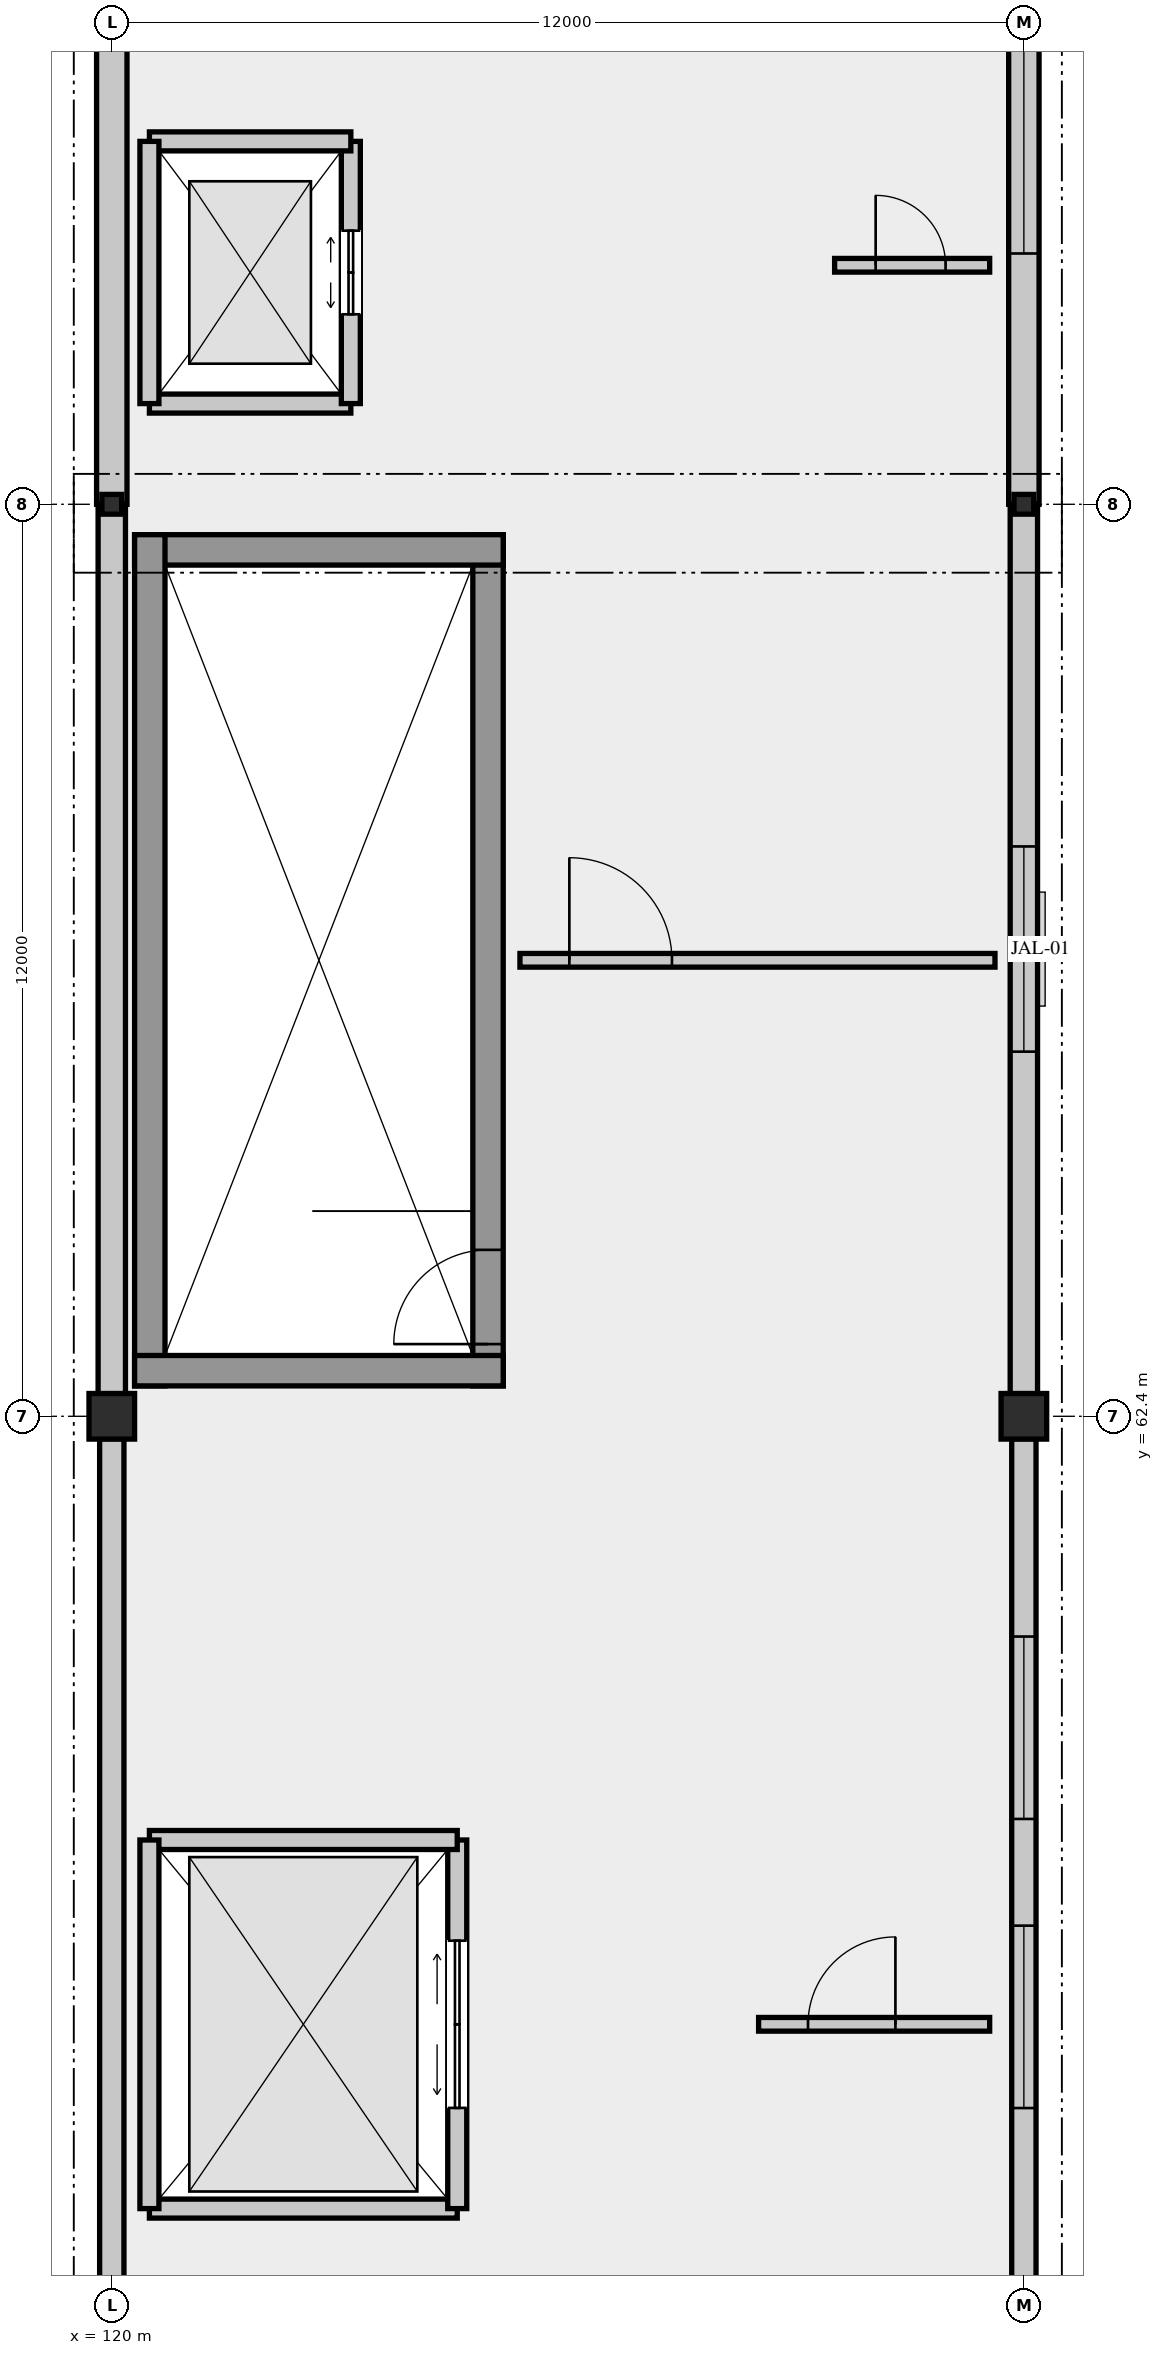
"""IFC4 building model, lengths in metres.
Left out: names, types, materials, properties, quantities, classifications, styles, units other than length and angle.
Written with IfcOpenShell. Run it as: python <this file> out.ifc"""

import sys

from ifc_helpers import new_model, si_unit, direction, frame, frame_2d, origin, origin_2d, place, context, subcontext, project, spatial, rectangle, i_section, extrude, element, fill, save


model = new_model("IFC4")
c1 = context("Model", 3, precision=1e-05, world=origin(), true_north=direction((0.0, 1.0)))
c2 = subcontext(c1, "Body", "Model", "MODEL_VIEW")
j1 = project(units=[si_unit("LENGTHUNIT", "METRE"), si_unit("PLANEANGLEUNIT", "RADIAN")], contexts=[c1])
p1 = place(None, origin())
s1 = spatial("IfcSite", under=j1, at=p1, CompositionType="ELEMENT")
p2 = place(p1, origin())
s2 = spatial("IfcBuilding", under=s1, at=p2, CompositionType="ELEMENT")
p3 = place(p2, frame((0.0, 0.0, 16.8)))
s3 = spatial("IfcBuildingStorey", under=s2, at=p3, CompositionType="ELEMENT", Elevation=16.8)
p4 = place(p3, frame((120.0, 62.4, 0.0), z_axis=(0.0, 0.0, 1.0), x_axis=(1.0, 0.0, 0.0)))
e1 = element("IfcColumn", 1, at=p4, inside=s3, PredefinedType="COLUMN", context=c2, shape_type="SweptSolid", body=[
    extrude(rectangle(XDim=0.6, YDim=0.6, at=origin_2d()), origin(), (0.0, 0.0, 1.0), 6.6),
])
p5 = place(p3, frame((120.0, 74.4, 0.0), z_axis=(0.0, 0.0, 1.0), x_axis=(1.0, 0.0, 0.0)))
e2 = element("IfcColumn", 2, at=p5, inside=s3, PredefinedType="COLUMN", context=c2, shape_type="SweptSolid", body=[
    extrude(i_section(OverallWidth=0.26, OverallDepth=0.26, WebThickness=0.01, FlangeThickness=0.018, FilletRadius=0.024, at=origin_2d()), origin(), (0.0, 0.0, 1.0), 6.6),
])
p6 = place(p3, frame((132.0, 62.4, 0.0), z_axis=(0.0, 0.0, 1.0), x_axis=(1.0, 0.0, 0.0)))
e3 = element("IfcColumn", 3, at=p6, inside=s3, PredefinedType="COLUMN", context=c2, shape_type="SweptSolid", body=[
    extrude(rectangle(XDim=0.6, YDim=0.6, at=origin_2d()), origin(), (0.0, 0.0, 1.0), 6.6),
])
p7 = place(p3, frame((132.0, 74.4, 0.0), z_axis=(0.0, 0.0, 1.0), x_axis=(1.0, 0.0, 0.0)))
e4 = element("IfcColumn", 4, at=p7, inside=s3, PredefinedType="COLUMN", context=c2, shape_type="SweptSolid", body=[
    extrude(i_section(OverallWidth=0.26, OverallDepth=0.26, WebThickness=0.01, FlangeThickness=0.018, FilletRadius=0.024, at=origin_2d()), origin(), (0.0, 0.0, 1.0), 6.6),
])
p8 = place(p3, frame((120.0, 62.105, 0.0), z_axis=(0.0, 0.0, 1.0), x_axis=(0.0, -1.0, 0.0)))
e5 = element("IfcWall", 5, at=p8, inside=s3, PredefinedType="SOLIDWALL", context=c2, shape_type="SweptSolid", body=[
    extrude(rectangle(XDim=11.41, YDim=0.32, at=frame_2d((5.705, 0.0))), origin(), (0.0, 0.0, 1.0), 5.75),
])
p9 = place(p3, frame((132.0, 50.695, 0.0), z_axis=(0.0, 0.0, 1.0), x_axis=(0.0, 1.0, 0.0)))
e6 = element("IfcWall", 6, at=p9, inside=s3, PredefinedType="SOLIDWALL", context=c2, shape_type="SweptSolid", body=[
    extrude(rectangle(XDim=11.41, YDim=0.32, at=frame_2d((5.705, 0.0))), origin(), (0.0, 0.0, 1.0), 5.75),
])
p10 = place(p9, frame((2.603, 0.0, 0.95)))
e7 = element("IfcOpeningElement", 7, at=p10, cuts=e6, PredefinedType="OPENING", context=c2, shape_type="SweptSolid", body=[
    extrude(rectangle(XDim=2.4, YDim=1.8, at=frame_2d((1.2, 0.9))), frame((0.0, 0.17, 0.0), z_axis=(0.0, -1.0, 0.0), x_axis=(1.0, 0.0, 0.0)), (0.0, 0.0, 1.0), 0.34),
])
p11 = place(p9, frame((6.407, 0.0, 0.95)))
e8 = element("IfcOpeningElement", 8, at=p11, cuts=e6, PredefinedType="OPENING", context=c2, shape_type="SweptSolid", body=[
    extrude(rectangle(XDim=2.4, YDim=1.8, at=frame_2d((1.2, 0.9))), frame((0.0, 0.17, 0.0), z_axis=(0.0, -1.0, 0.0), x_axis=(1.0, 0.0, 0.0)), (0.0, 0.0, 1.0), 0.34),
])
p12 = place(p3, frame((120.0, 74.4, 0.0), z_axis=(0.0, 0.0, 1.0), x_axis=(0.0, -1.0, 0.0)))
e9 = element("IfcWall", 9, at=p12, inside=s3, PredefinedType="SOLIDWALL", context=c2, shape_type="SweptSolid", body=[
    extrude(rectangle(XDim=11.705, YDim=0.36, at=frame_2d((5.853, 0.0))), origin(), (0.0, 0.0, 1.0), 5.75),
])
p13 = place(p3, frame((132.0, 62.695, 0.0), z_axis=(0.0, 0.0, 1.0), x_axis=(0.0, 1.0, 0.0)))
e10 = element("IfcWall", 10, at=p13, inside=s3, PredefinedType="SOLIDWALL", context=c2, shape_type="SweptSolid", body=[
    extrude(rectangle(XDim=11.705, YDim=0.36, at=frame_2d((5.853, 0.0))), origin(), (0.0, 0.0, 1.0), 5.75),
])
p14 = place(p13, frame((4.503, 0.0, 0.95)))
e11 = element("IfcOpeningElement", 11, at=p14, cuts=e10, PredefinedType="OPENING", context=c2, shape_type="SweptSolid", body=[
    extrude(rectangle(XDim=2.7, YDim=1.8, at=frame_2d((1.35, 0.9))), frame((0.0, 0.19, 0.0), z_axis=(0.0, -1.0, 0.0), x_axis=(1.0, 0.0, 0.0)), (0.0, 0.0, 1.0), 0.38),
])
p15 = place(p3, frame((120.0, 84.0, 0.0), z_axis=(0.0, 0.0, 1.0), x_axis=(0.0, -1.0, 0.0)))
e12 = element("IfcWall", 12, at=p15, inside=s3, PredefinedType="SOLIDWALL", context=c2, shape_type="SweptSolid", body=[
    extrude(rectangle(XDim=9.6, YDim=0.4, at=frame_2d((4.8, 0.0))), origin(), (0.0, 0.0, 1.0), 5.6),
])
p16 = place(p3, frame((132.0, 74.4, 0.0), z_axis=(0.0, 0.0, 1.0), x_axis=(0.0, 1.0, 0.0)))
e13 = element("IfcWall", 13, at=p16, inside=s3, PredefinedType="SOLIDWALL", context=c2, shape_type="SweptSolid", body=[
    extrude(rectangle(XDim=9.6, YDim=0.4, at=frame_2d((4.8, 0.0))), origin(), (0.0, 0.0, 1.0), 5.75),
])
p17 = place(p16, frame((3.3, 0.0, 0.95)))
e14 = element("IfcOpeningElement", 14, at=p17, cuts=e13, PredefinedType="OPENING", context=c2, shape_type="SweptSolid", body=[
    extrude(rectangle(XDim=3.0, YDim=1.8, at=frame_2d((1.5, 0.9))), frame((0.0, 0.21, 0.0), z_axis=(0.0, -1.0, 0.0), x_axis=(1.0, 0.0, 0.0)), (0.0, 0.0, 1.0), 0.42),
])
p18 = place(p3, frame((124.95, 62.8, 0.0), z_axis=(0.0, 0.0, 1.0), x_axis=(0.0, 1.0, 0.0)))
e15 = element("IfcWall", 15, at=p18, inside=s3, PredefinedType="SHEAR", context=c2, shape_type="SweptSolid", body=[
    extrude(rectangle(XDim=11.2, YDim=0.4, at=frame_2d((5.6, 0.0))), origin(), (0.0, 0.0, 1.0), 6.35),
])
p19 = place(p18, frame((0.55, 0.0, 0.0)))
e16 = element("IfcOpeningElement", 16, at=p19, cuts=e15, PredefinedType="OPENING", context=c2, shape_type="SweptSolid", body=[
    extrude(rectangle(XDim=1.24, YDim=2.25, at=frame_2d((0.62, 1.125))), frame((0.0, 0.21, 0.0), z_axis=(0.0, -1.0, 0.0), x_axis=(1.0, 0.0, 0.0)), (0.0, 0.0, 1.0), 0.42),
])
p20 = place(p3, frame((125.15, 73.8, 0.0), z_axis=(0.0, 0.0, 1.0), x_axis=(-1.0, 0.0, 0.0)))
e17 = element("IfcWall", 17, at=p20, inside=s3, PredefinedType="SHEAR", context=c2, shape_type="SweptSolid", body=[
    extrude(rectangle(XDim=4.85, YDim=0.4, at=frame_2d((2.425, 0.0))), origin(), (0.0, 0.0, 1.0), 6.35),
])
p21 = place(p3, frame((120.5, 74.0, 0.0), z_axis=(0.0, 0.0, 1.0), x_axis=(0.0, -1.0, 0.0)))
e18 = element("IfcWall", 18, at=p21, inside=s3, PredefinedType="SHEAR", context=c2, shape_type="SweptSolid", body=[
    extrude(rectangle(XDim=11.2, YDim=0.4, at=frame_2d((5.6, 0.0))), origin(), (0.0, 0.0, 1.0), 6.35),
])
p22 = place(p3, frame((120.3, 63.0, 0.0), z_axis=(0.0, 0.0, 1.0), x_axis=(1.0, 0.0, 0.0)))
e19 = element("IfcWall", 19, at=p22, inside=s3, PredefinedType="SHEAR", context=c2, shape_type="SweptSolid", body=[
    extrude(rectangle(XDim=4.85, YDim=0.4, at=frame_2d((2.425, 0.0))), origin(), (0.0, 0.0, 1.0), 6.35),
])
p23 = place(p3, frame((120.495, 75.725, 0.0), z_axis=(0.0, 0.0, 1.0), x_axis=(1.0, 0.0, 0.0)))
e20 = element("IfcWall", 20, at=p23, inside=s3, PredefinedType="SOLIDWALL", context=c2, shape_type="SweptSolid", body=[
    extrude(rectangle(XDim=2.65, YDim=0.25, at=frame_2d((1.325, 0.0))), origin(), (0.0, 0.0, 1.0), 6.35),
])
p24 = place(p3, frame((123.145, 75.725, 0.0), z_axis=(0.0, 0.0, 1.0), x_axis=(0.0, 1.0, 0.0)))
e21 = element("IfcWall", 21, at=p24, inside=s3, PredefinedType="SOLIDWALL", context=c2, shape_type="SweptSolid", body=[
    extrude(rectangle(XDim=3.45, YDim=0.25, at=frame_2d((1.725, 0.0))), origin(), (0.0, 0.0, 1.0), 6.35),
])
p25 = place(p24, frame((1.175, 0.0, 0.0)))
e22 = element("IfcOpeningElement", 22, at=p25, cuts=e21, PredefinedType="OPENING", context=c2, shape_type="SweptSolid", body=[
    extrude(rectangle(XDim=1.1, YDim=2.2, at=frame_2d((0.55, 1.1))), frame((0.0, 0.135, 0.0), z_axis=(0.0, -1.0, 0.0), x_axis=(1.0, 0.0, 0.0)), (0.0, 0.0, 1.0), 0.27),
])
p26 = place(p3, frame((123.145, 79.175, 0.0), z_axis=(0.0, 0.0, 1.0), x_axis=(-1.0, 0.0, 0.0)))
e23 = element("IfcWall", 23, at=p26, inside=s3, PredefinedType="SOLIDWALL", context=c2, shape_type="SweptSolid", body=[
    extrude(rectangle(XDim=2.65, YDim=0.25, at=frame_2d((1.325, 0.0))), origin(), (0.0, 0.0, 1.0), 6.35),
])
p27 = place(p3, frame((120.495, 79.175, 0.0), z_axis=(0.0, 0.0, 1.0), x_axis=(0.0, -1.0, 0.0)))
e24 = element("IfcWall", 24, at=p27, inside=s3, PredefinedType="SOLIDWALL", context=c2, shape_type="SweptSolid", body=[
    extrude(rectangle(XDim=3.45, YDim=0.25, at=frame_2d((1.725, 0.0))), origin(), (0.0, 0.0, 1.0), 6.35),
])
p28 = place(p3, frame((120.495, 51.975, 0.0), z_axis=(0.0, 0.0, 1.0), x_axis=(1.0, 0.0, 0.0)))
e25 = element("IfcWall", 25, at=p28, inside=s3, PredefinedType="SOLIDWALL", context=c2, shape_type="SweptSolid", body=[
    extrude(rectangle(XDim=4.05, YDim=0.25, at=frame_2d((2.025, 0.0))), origin(), (0.0, 0.0, 1.0), 6.34),
])
p29 = place(p3, frame((124.545, 51.975, 0.0), z_axis=(0.0, 0.0, 1.0), x_axis=(0.0, 1.0, 0.0)))
e26 = element("IfcWall", 26, at=p29, inside=s3, PredefinedType="SOLIDWALL", context=c2, shape_type="SweptSolid", body=[
    extrude(rectangle(XDim=4.85, YDim=0.25, at=frame_2d((2.425, 0.0))), origin(), (0.0, 0.0, 1.0), 6.34),
])
p30 = place(p29, frame((1.325, 0.0, 0.0)))
e27 = element("IfcOpeningElement", 27, at=p30, cuts=e26, PredefinedType="OPENING", context=c2, shape_type="SweptSolid", body=[
    extrude(rectangle(XDim=2.2, YDim=2.65, at=frame_2d((1.1, 1.325))), frame((0.0, 0.135, 0.0), z_axis=(0.0, -1.0, 0.0), x_axis=(1.0, 0.0, 0.0)), (0.0, 0.0, 1.0), 0.27),
])
p31 = place(p3, frame((124.545, 56.825, 0.0), z_axis=(0.0, 0.0, 1.0), x_axis=(-1.0, 0.0, 0.0)))
e28 = element("IfcWall", 28, at=p31, inside=s3, PredefinedType="SOLIDWALL", context=c2, shape_type="SweptSolid", body=[
    extrude(rectangle(XDim=4.05, YDim=0.25, at=frame_2d((2.025, 0.0))), origin(), (0.0, 0.0, 1.0), 6.34),
])
p32 = place(p3, frame((120.495, 56.825, 0.0), z_axis=(0.0, 0.0, 1.0), x_axis=(0.0, -1.0, 0.0)))
e29 = element("IfcWall", 29, at=p32, inside=s3, PredefinedType="SOLIDWALL", context=c2, shape_type="SweptSolid", body=[
    extrude(rectangle(XDim=4.85, YDim=0.25, at=frame_2d((2.425, 0.0))), origin(), (0.0, 0.0, 1.0), 6.34),
])
p33 = place(p3, frame((128.51, 54.4, 0.0), z_axis=(0.0, 0.0, 1.0), x_axis=(1.0, 0.0, 0.0)))
e30 = element("IfcWall", 30, at=p33, inside=s3, PredefinedType="PARTITIONING", context=c2, shape_type="SweptSolid", body=[
    extrude(rectangle(XDim=3.04, YDim=0.18, at=frame_2d((1.52, 0.0))), origin(), (0.0, 0.0, 1.0), 5.91),
])
p34 = place(p33, frame((0.65, 0.0, 0.0)))
e31 = element("IfcOpeningElement", 31, at=p34, cuts=e30, PredefinedType="OPENING", context=c2, shape_type="SweptSolid", body=[
    extrude(rectangle(XDim=1.15, YDim=2.25, at=frame_2d((0.575, 1.125))), frame((0.0, 0.1, 0.0), z_axis=(0.0, -1.0, 0.0), x_axis=(1.0, 0.0, 0.0)), (0.0, 0.0, 1.0), 0.2),
])
p35 = place(p3, frame((125.37, 68.4, 0.0), z_axis=(0.0, 0.0, 1.0), x_axis=(1.0, 0.0, 0.0)))
e32 = element("IfcWall", 32, at=p35, inside=s3, PredefinedType="PARTITIONING", context=c2, shape_type="SweptSolid", body=[
    extrude(rectangle(XDim=6.25, YDim=0.18, at=frame_2d((3.125, 0.0))), origin(), (0.0, 0.0, 1.0), 5.91),
])
p36 = place(p35, frame((0.65, 0.0, 0.0)))
e33 = element("IfcOpeningElement", 33, at=p36, cuts=e32, PredefinedType="OPENING", context=c2, shape_type="SweptSolid", body=[
    extrude(rectangle(XDim=1.35, YDim=2.3, at=frame_2d((0.675, 1.15))), frame((0.0, 0.1, 0.0), z_axis=(0.0, -1.0, 0.0), x_axis=(1.0, 0.0, 0.0)), (0.0, 0.0, 1.0), 0.2),
])
p37 = place(p3, frame((129.51, 77.545, 0.0), z_axis=(0.0, 0.0, 1.0), x_axis=(1.0, 0.0, 0.0)))
e34 = element("IfcWall", 34, at=p37, inside=s3, PredefinedType="PARTITIONING", context=c2, shape_type="SweptSolid", body=[
    extrude(rectangle(XDim=2.04, YDim=0.18, at=frame_2d((1.02, 0.0))), origin(), (0.0, 0.0, 1.0), 5.95),
])
p38 = place(p37, frame((0.54, 0.0, 0.0)))
e35 = element("IfcOpeningElement", 35, at=p38, cuts=e34, PredefinedType="OPENING", context=c2, shape_type="SweptSolid", body=[
    extrude(rectangle(XDim=0.92, YDim=2.15, at=frame_2d((0.46, 1.075))), frame((0.0, 0.1, 0.0), z_axis=(0.0, -1.0, 0.0), x_axis=(1.0, 0.0, 0.0)), (0.0, 0.0, 1.0), 0.2),
])
p39 = place(p10, origin())
e36 = element("IfcWindow", 36, at=p39, inside=s3, PartitioningType="SINGLE_PANEL", PredefinedType="WINDOW", context=c2, shape_type="SweptSolid", body=[
    extrude(rectangle(XDim=2.4, YDim=1.8, at=frame_2d((1.2, 0.9))), frame((0.0, 0.03, 0.0), z_axis=(0.0, -1.0, 0.0), x_axis=(1.0, 0.0, 0.0)), (0.0, 0.0, 1.0), 0.06),
])
fill(e7, e36)
p40 = place(p11, origin())
e37 = element("IfcWindow", 37, at=p40, inside=s3, PartitioningType="SINGLE_PANEL", PredefinedType="WINDOW", context=c2, shape_type="SweptSolid", body=[
    extrude(rectangle(XDim=2.4, YDim=1.8, at=frame_2d((1.2, 0.9))), frame((0.0, 0.03, 0.0), z_axis=(0.0, -1.0, 0.0), x_axis=(1.0, 0.0, 0.0)), (0.0, 0.0, 1.0), 0.06),
])
fill(e8, e37)
p41 = place(p14, origin())
e38 = element("IfcWindow", 38, at=p41, inside=s3, PartitioningType="SINGLE_PANEL", PredefinedType="WINDOW", context=c2, shape_type="SweptSolid", body=[
    extrude(rectangle(XDim=2.7, YDim=1.8, at=frame_2d((1.35, 0.9))), frame((0.0, 0.03, 0.0), z_axis=(0.0, -1.0, 0.0), x_axis=(1.0, 0.0, 0.0)), (0.0, 0.0, 1.0), 0.06),
])
fill(e11, e38)
p42 = place(p17, origin())
e39 = element("IfcWindow", 39, at=p42, inside=s3, PartitioningType="SINGLE_PANEL", PredefinedType="WINDOW", context=c2, shape_type="SweptSolid", body=[
    extrude(rectangle(XDim=3.0, YDim=1.8, at=frame_2d((1.5, 0.9))), frame((0.0, 0.03, 0.0), z_axis=(0.0, -1.0, 0.0), x_axis=(1.0, 0.0, 0.0)), (0.0, 0.0, 1.0), 0.06),
])
fill(e14, e39)
p43 = place(p19, origin())
e40 = element("IfcDoor", 40, at=p43, inside=s3, OperationType="SINGLE_SWING_LEFT", PredefinedType="DOOR", context=c2, shape_type="SweptSolid", body=[
    extrude(rectangle(XDim=1.24, YDim=2.25, at=frame_2d((0.62, 1.125))), frame((0.0, 0.025, 0.0), z_axis=(0.0, -1.0, 0.0), x_axis=(1.0, 0.0, 0.0)), (0.0, 0.0, 1.0), 0.05),
])
fill(e16, e40)
p44 = place(p25, origin())
e41 = element("IfcDoor", 41, at=p44, inside=s3, OperationType="SLIDING_TO_LEFT", PredefinedType="DOOR", context=c2, shape_type="SweptSolid", body=[
    extrude(rectangle(XDim=1.1, YDim=2.2, at=frame_2d((0.55, 1.1))), frame((0.0, 0.025, 0.0), z_axis=(0.0, -1.0, 0.0), x_axis=(1.0, 0.0, 0.0)), (0.0, 0.0, 1.0), 0.05),
])
fill(e22, e41)
p45 = place(p30, origin())
e42 = element("IfcDoor", 42, at=p45, inside=s3, OperationType="DOUBLE_DOOR_SLIDING", PredefinedType="DOOR", context=c2, shape_type="SweptSolid", body=[
    extrude(rectangle(XDim=2.2, YDim=2.65, at=frame_2d((1.1, 1.325))), frame((0.0, 0.025, 0.0), z_axis=(0.0, -1.0, 0.0), x_axis=(1.0, 0.0, 0.0)), (0.0, 0.0, 1.0), 0.05),
])
fill(e27, e42)
p46 = place(p34, origin())
e43 = element("IfcDoor", 43, at=p46, inside=s3, OperationType="SINGLE_SWING_RIGHT", PredefinedType="DOOR", context=c2, shape_type="SweptSolid", body=[
    extrude(rectangle(XDim=1.15, YDim=2.25, at=frame_2d((0.575, 1.125))), frame((0.0, 0.025, 0.0), z_axis=(0.0, -1.0, 0.0), x_axis=(1.0, 0.0, 0.0)), (0.0, 0.0, 1.0), 0.05),
])
fill(e31, e43)
p47 = place(p36, origin())
e44 = element("IfcDoor", 44, at=p47, inside=s3, OperationType="DOUBLE_SWING_LEFT", PredefinedType="DOOR", context=c2, shape_type="SweptSolid", body=[
    extrude(rectangle(XDim=1.35, YDim=2.3, at=frame_2d((0.675, 1.15))), frame((0.0, 0.025, 0.0), z_axis=(0.0, -1.0, 0.0), x_axis=(1.0, 0.0, 0.0)), (0.0, 0.0, 1.0), 0.05),
])
fill(e33, e44)
p48 = place(p38, origin())
e45 = element("IfcDoor", 45, at=p48, inside=s3, OperationType="SINGLE_SWING_LEFT", PredefinedType="DOOR", context=c2, shape_type="SweptSolid", body=[
    extrude(rectangle(XDim=0.92, YDim=2.15, at=frame_2d((0.46, 1.075))), frame((0.0, 0.025, 0.0), z_axis=(0.0, -1.0, 0.0), x_axis=(1.0, 0.0, 0.0)), (0.0, 0.0, 1.0), 0.05),
])
fill(e35, e45)
save(model, sys.argv[1])
